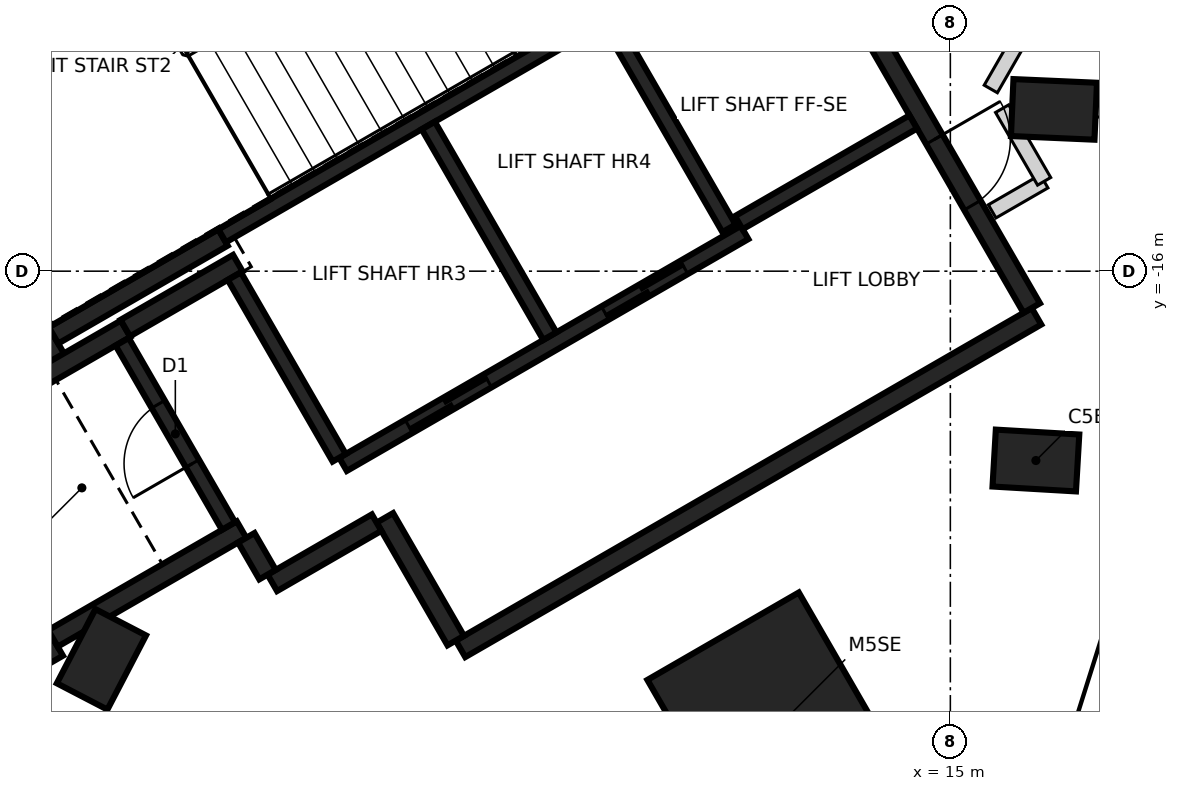
"""IFC4 building model, lengths in metres.
Left out: names, types, materials, properties, quantities, classifications, styles, units other than length and angle.
Written with IfcOpenShell. Run it as: python <this file> out.ifc"""

import sys

from ifc_helpers import new_model, si_unit, direction, frame, frame_2d, origin, origin_2d, place, context, subcontext, project, spatial, rectangle, extrude, element, fill, save


model = new_model("IFC4")
c1 = context("Model", 3, precision=1e-05, world=origin(), true_north=direction((0.0, 1.0)))
c2 = subcontext(c1, "Body", "Model", "MODEL_VIEW")
j1 = project(units=[si_unit("LENGTHUNIT", "METRE"), si_unit("PLANEANGLEUNIT", "RADIAN")], contexts=[c1])
p1 = place(None, origin())
s1 = spatial("IfcSite", under=j1, at=p1, CompositionType="ELEMENT")
p2 = place(p1, origin())
s2 = spatial("IfcBuilding", under=s1, at=p2, CompositionType="ELEMENT")
p3 = place(p2, frame((0.0, 0.0, 253.8)))
s3 = spatial("IfcBuildingStorey", under=s2, at=p3, CompositionType="ELEMENT", Elevation=253.8)
for number, where, z_axis, x_axis in (
    (1, (16.125, -18.491, -0.35), (0.0, 0.0, 1.0), (-0.998, 0.058, 0.0)),
    (2, (16.363, -13.872, -0.35), (0.0, 0.0, 1.0), (-0.999, 0.044, 0.0)),
    (3, (3.832, -21.107, -0.35), (0.0, 0.0, 1.0), (0.461, 0.887, 0.0)),
):
    element("IfcColumn", number, at=place(p3, frame(where, z_axis=z_axis, x_axis=x_axis)), inside=s3, PredefinedType="COLUMN", context=c2, shape_type="SweptSolid", body=[
        extrude(rectangle(XDim=1.1, YDim=0.75, at=origin_2d()), origin(), (0.0, 0.0, 1.0), 2.64),
    ])
p4 = place(p3, frame((12.71, -22.015, -0.35), z_axis=(0.0, 0.0, 1.0), x_axis=(-0.5, 0.866025403784, 0.0)))
e4 = element("IfcColumn", 4, at=p4, inside=s3, PredefinedType="COLUMN", context=c2, shape_type="SweptSolid", body=[
    extrude(rectangle(XDim=2.8, YDim=2.3, at=origin_2d()), origin(), (0.0, 0.0, 1.0), 3.55),
])
p5 = place(p3, frame((16.133, -16.594, 0.0), z_axis=(0.0, 0.0, 1.0), x_axis=(-0.866022959057, -0.500004234368, 0.0)))
e5 = element("IfcWall", 5, at=p5, inside=s3, PredefinedType="SHEAR", context=c2, shape_type="SweptSolid", body=[
    extrude(rectangle(XDim=8.75, YDim=0.25, at=frame_2d((4.375, 0.0))), origin(), (0.0, 0.0, 1.0), 3.2),
])
p6 = place(p3, frame((13.008, -11.181, 0.0), z_axis=(0.0, 0.0, 1.0), x_axis=(0.500001955336, -0.866024274868, 0.0)))
e6 = element("IfcWall", 6, at=p6, inside=s3, PredefinedType="SHEAR", context=c2, shape_type="SweptSolid", body=[
    extrude(rectangle(XDim=6.125, YDim=0.25, at=frame_2d((3.062, 0.0))), origin(), (0.0, 0.0, 1.0), 3.2),
])
p7 = place(p6, frame((3.563, 0.0, 0.0)))
e7 = element("IfcOpeningElement", 7, at=p7, cuts=e6, PredefinedType="OPENING", context=c2, shape_type="SweptSolid", body=[
    extrude(rectangle(XDim=1.0, YDim=2.1, at=frame_2d((0.5, 1.05))), frame((0.0, 0.135, 0.0), z_axis=(0.0, -1.0, 0.0), x_axis=(1.0, 0.0, 0.0)), (0.0, 0.0, 1.0), 0.27),
])
p8 = place(p3, frame((3.235, -17.153, 0.0), z_axis=(0.0, 0.0, 1.0), x_axis=(-0.500008851346, 0.866020293397, 0.0)))
e8 = element("IfcWall", 8, at=p8, inside=s3, PredefinedType="SHEAR", context=c2, shape_type="SweptSolid", body=[
    extrude(rectangle(XDim=5.51, YDim=0.25, at=frame_2d((2.755, 0.0))), origin(), (0.0, 0.0, 1.0), 3.2),
])
p9 = place(p3, frame((3.217, -21.122, 0.0), z_axis=(0.0, 0.0, 1.0), x_axis=(-0.499998874531, 0.866026053573, 0.0)))
e9 = element("IfcWall", 9, at=p9, inside=s3, PredefinedType="SHEAR", context=c2, shape_type="SweptSolid", body=[
    extrude(rectangle(XDim=3.313, YDim=0.25, at=frame_2d((1.656, 0.0))), origin(), (0.0, 0.0, 1.0), 3.2),
])
p10 = place(p3, frame((1.669, -18.19, 0.0), z_axis=(0.0, 0.0, 1.0), x_axis=(0.866042235819, 0.499970844928, 0.0)))
e10 = element("IfcWall", 10, at=p10, inside=s3, PredefinedType="SHEAR", context=c2, shape_type="SweptSolid", body=[
    extrude(rectangle(XDim=2.865, YDim=0.25, at=frame_2d((1.432, 0.0))), origin(), (0.0, 0.0, 1.0), 3.2),
])
p11 = place(p3, frame((5.675, -19.399, 0.0), z_axis=(0.0, 0.0, 1.0), x_axis=(-0.866026637627, -0.499997862916, 0.0)))
e11 = element("IfcWall", 11, at=p11, inside=s3, PredefinedType="SHEAR", context=c2, shape_type="SweptSolid", body=[
    extrude(rectangle(XDim=2.865, YDim=0.25, at=frame_2d((1.432, 0.0))), origin(), (0.0, 0.0, 1.0), 3.2),
])
p12 = place(p3, frame((5.431, -15.556, 0.0), z_axis=(0.0, 0.0, 1.0), x_axis=(-0.866022940537, -0.500004266446, 0.0)))
e12 = element("IfcWall", 12, at=p12, inside=s3, PredefinedType="SHEAR", context=c2, shape_type="SweptSolid", body=[
    extrude(rectangle(XDim=2.575, YDim=0.25, at=frame_2d((1.287, 0.0))), origin(), (0.0, 0.0, 1.0), 3.2),
])
p13 = place(p3, frame((8.493, -20.86, 0.0), z_axis=(0.0, 0.0, 1.0), x_axis=(-0.500039802285, 0.866002422705, 0.0)))
e13 = element("IfcWall", 13, at=p13, inside=s3, PredefinedType="SHEAR", context=c2, shape_type="SweptSolid", body=[
    extrude(rectangle(XDim=1.865, YDim=0.25, at=frame_2d((0.932, 0.0))), origin(), (0.0, 0.0, 1.0), 3.2),
])
p14 = place(p3, frame((4.145, -16.749, 0.0), z_axis=(0.0, 0.0, 1.0), x_axis=(0.866038183914, 0.499977863513, 0.0)))
e14 = element("IfcWall", 14, at=p14, inside=s3, PredefinedType="SHEAR", context=c2, shape_type="SweptSolid", body=[
    extrude(rectangle(XDim=1.71, YDim=0.25, at=frame_2d((0.855, 0.0))), origin(), (0.0, 0.0, 1.0), 3.2),
])
p15 = place(p3, frame((7.452, -19.308, 0.0), z_axis=(0.0, 0.0, 1.0), x_axis=(-0.866044474677, -0.49996696679, 0.0)))
e15 = element("IfcWall", 15, at=p15, inside=s3, PredefinedType="SHEAR", context=c2, shape_type="SweptSolid", body=[
    extrude(rectangle(XDim=1.584, YDim=0.25, at=frame_2d((0.792, 0.0))), origin(), (0.0, 0.0, 1.0), 3.2),
])
p16 = place(p3, frame((6.017, -19.992, 0.0), z_axis=(0.0, 0.0, 1.0), x_axis=(-0.500364886717, 0.865814633822, 0.0)))
e16 = element("IfcWall", 16, at=p16, inside=s3, PredefinedType="SHEAR", context=c2, shape_type="SweptSolid", body=[
    extrude(rectangle(XDim=0.559, YDim=0.25, at=frame_2d((0.28, 0.0))), origin(), (0.0, 0.0, 1.0), 3.2),
])
p17 = place(p3, frame((5.419, -15.534, 0.0), z_axis=(0.0, 0.0, 1.0), x_axis=(0.866029065029, 0.499993658486, 0.0)))
e17 = element("IfcWall", 17, at=p17, inside=s3, PredefinedType="SHEAR", context=c2, shape_type="SweptSolid", body=[
    extrude(rectangle(XDim=5.974, YDim=0.2, at=frame_2d((2.987, 0.0))), origin(), (0.0, 0.0, 1.0), 3.2),
])
p18 = place(p3, frame((7.01, -18.542, 0.0), z_axis=(0.0, 0.0, 1.0), x_axis=(0.866030299012, 0.499991521122, 0.0)))
e18 = element("IfcWall", 18, at=p18, inside=s3, PredefinedType="SHEAR", context=c2, shape_type="SweptSolid", body=[
    extrude(rectangle(XDim=6.1, YDim=0.2, at=frame_2d((3.05, 0.0))), origin(), (0.0, 0.0, 1.0), 3.2),
])
p19 = place(p18, frame((1.0, 0.0, 0.0)))
e19 = element("IfcOpeningElement", 19, at=p19, cuts=e18, PredefinedType="OPENING", context=c2, shape_type="SweptSolid", body=[
    extrude(rectangle(XDim=1.2, YDim=2.1, at=frame_2d((0.6, 1.05))), frame((0.0, 0.11, 0.0), z_axis=(0.0, -1.0, 0.0), x_axis=(1.0, 0.0, 0.0)), (0.0, 0.0, 1.0), 0.22),
])
p20 = place(p18, frame((3.982, 0.0, 0.0)))
e20 = element("IfcOpeningElement", 20, at=p20, cuts=e18, PredefinedType="OPENING", context=c2, shape_type="SweptSolid", body=[
    extrude(rectangle(XDim=1.2, YDim=2.1, at=frame_2d((0.6, 1.05))), frame((0.0, 0.11, 0.0), z_axis=(0.0, -1.0, 0.0), x_axis=(1.0, 0.0, 0.0)), (0.0, 0.0, 1.0), 0.22),
])
p21 = place(p3, frame((8.132, -14.084, 0.0), z_axis=(0.0, 0.0, 1.0), x_axis=(0.499997778408, -0.866026686418, 0.0)))
e21 = element("IfcWall", 21, at=p21, inside=s3, PredefinedType="SHEAR", context=c2, shape_type="SweptSolid", body=[
    extrude(rectangle(XDim=3.198, YDim=0.2, at=frame_2d((1.599, 0.0))), origin(), (0.0, 0.0, 1.0), 3.2),
])
p22 = place(p3, frame((5.503, -19.352, 0.0), z_axis=(0.0, 0.0, 1.0), x_axis=(-0.499986818241, 0.866033014143, 0.0)))
e22 = element("IfcWall", 22, at=p22, inside=s3, PredefinedType="SHEAR", context=c2, shape_type="SweptSolid", body=[
    extrude(rectangle(XDim=2.798, YDim=0.2, at=frame_2d((1.399, 0.0))), origin(), (0.0, 0.0, 1.0), 3.2),
])
p23 = place(p22, frame((0.949, 0.0, 0.0)))
e23 = element("IfcOpeningElement", 23, at=p23, cuts=e22, PredefinedType="OPENING", context=c2, shape_type="SweptSolid", body=[
    extrude(rectangle(XDim=0.9, YDim=2.1, at=frame_2d((0.45, 1.05))), frame((0.0, 0.11, 0.0), z_axis=(0.0, -1.0, 0.0), x_axis=(1.0, 0.0, 0.0)), (0.0, 0.0, 1.0), 0.22),
])
p24 = place(p3, frame((6.96, -18.455, 0.0), z_axis=(0.0, 0.0, 1.0), x_axis=(-0.499926705758, 0.866067716099, 0.0)))
e24 = element("IfcWall", 24, at=p24, inside=s3, PredefinedType="SHEAR", context=c2, shape_type="SweptSolid", body=[
    extrude(rectangle(XDim=2.759, YDim=0.2, at=frame_2d((1.38, 0.0))), origin(), (0.0, 0.0, 1.0), 3.2),
])
p25 = place(p3, frame((12.088, -15.437, 0.0), z_axis=(0.0, 0.0, 1.0), x_axis=(-0.500026960575, 0.86600983753, 0.0)))
e25 = element("IfcWall", 25, at=p25, inside=s3, PredefinedType="SHEAR", context=c2, shape_type="SweptSolid", body=[
    extrude(rectangle(XDim=3.1, YDim=0.2, at=frame_2d((1.55, 0.0))), origin(), (0.0, 0.0, 1.0), 3.2),
])
p26 = place(p3, frame((14.512, -14.037, 0.0), z_axis=(0.0, 0.0, 1.0), x_axis=(-0.866018407898, -0.500012117035, 0.0)))
e26 = element("IfcWall", 26, at=p26, inside=s3, PredefinedType="SHEAR", context=c2, shape_type="SweptSolid", body=[
    extrude(rectangle(XDim=2.651, YDim=0.2, at=frame_2d((1.325, 0.0))), origin(), (0.0, 0.0, 1.0), 3.2),
])
p27 = place(p3, frame((15.55, -15.213, 0.0), z_axis=(0.0, 0.0, 1.0), x_axis=(0.865989998118, 0.500061319399, 0.0)))
e27 = element("IfcWall", 27, at=p27, inside=s3, PredefinedType="PARTITIONING", context=c2, shape_type="SweptSolid", body=[
    extrude(rectangle(XDim=0.79, YDim=0.2, at=frame_2d((0.395, 0.0))), origin(), (0.0, 0.0, 1.0), 3.2),
])
p28 = place(p3, frame((15.532, -13.603, 0.0), z_axis=(0.0, 0.0, 1.0), x_axis=(0.498203662485, 0.867060038686, 0.0)))
e28 = element("IfcWall", 28, at=p28, inside=s3, PredefinedType="PARTITIONING", context=c2, shape_type="SweptSolid", body=[
    extrude(rectangle(XDim=0.789, YDim=0.2, at=frame_2d((0.395, 0.0))), origin(), (0.0, 0.0, 1.0), 3.2),
])
p29 = place(p3, frame((15.681, -13.862, 0.0), z_axis=(0.0, 0.0, 1.0), x_axis=(0.500678970179, -0.86563304513, 0.0)))
e29 = element("IfcWall", 29, at=p29, inside=s3, PredefinedType="PARTITIONING", context=c2, shape_type="SweptSolid", body=[
    extrude(rectangle(XDim=1.104, YDim=0.2, at=frame_2d((0.552, 0.0))), origin(), (0.0, 0.0, 1.0), 3.2),
])
p30 = place(p3, frame((17.933, -13.872, 0.0), z_axis=(0.0, 0.0, 1.0), x_axis=(-1.0, 0.0, 0.0)))
e30 = element("IfcWall", 30, at=p30, inside=s3, PredefinedType="PARTITIONING", context=c2, shape_type="SweptSolid", body=[
    extrude(rectangle(XDim=1.899, YDim=0.2, at=frame_2d((0.95, 0.0))), origin(), (0.0, 0.0, 1.0), 3.2),
])
p31 = place(p19, origin())
e31 = element("IfcDoor", 31, at=p31, inside=s3, OperationType="DOUBLE_DOOR_SLIDING", PredefinedType="DOOR", context=c2, shape_type="SweptSolid", body=[
    extrude(rectangle(XDim=1.2, YDim=2.1, at=frame_2d((0.6, 1.05))), frame((0.0, 0.025, 0.0), z_axis=(0.0, -1.0, 0.0), x_axis=(1.0, 0.0, 0.0)), (0.0, 0.0, 1.0), 0.05),
])
fill(e19, e31)
p32 = place(p20, origin())
e32 = element("IfcDoor", 32, at=p32, inside=s3, OperationType="DOUBLE_DOOR_SLIDING", PredefinedType="DOOR", context=c2, shape_type="SweptSolid", body=[
    extrude(rectangle(XDim=1.2, YDim=2.1, at=frame_2d((0.6, 1.05))), frame((0.0, 0.025, 0.0), z_axis=(0.0, -1.0, 0.0), x_axis=(1.0, 0.0, 0.0)), (0.0, 0.0, 1.0), 0.05),
])
fill(e20, e32)
p33 = place(p7, origin())
e33 = element("IfcDoor", 33, at=p33, inside=s3, OperationType="SINGLE_SWING_LEFT", PredefinedType="DOOR", context=c2, shape_type="SweptSolid", body=[
    extrude(rectangle(XDim=1.0, YDim=2.1, at=frame_2d((0.5, 1.05))), frame((0.0, 0.025, 0.0), z_axis=(0.0, -1.0, 0.0), x_axis=(1.0, 0.0, 0.0)), (0.0, 0.0, 1.0), 0.05),
])
fill(e7, e33)
p34 = place(p23, origin())
e34 = element("IfcDoor", 34, at=p34, inside=s3, OperationType="SINGLE_SWING_LEFT", PredefinedType="DOOR", context=c2, shape_type="SweptSolid", body=[
    extrude(rectangle(XDim=0.9, YDim=2.1, at=frame_2d((0.45, 1.05))), frame((0.0, 0.025, 0.0), z_axis=(0.0, -1.0, 0.0), x_axis=(1.0, 0.0, 0.0)), (0.0, 0.0, 1.0), 0.05),
])
fill(e23, e34)
save(model, sys.argv[1])
